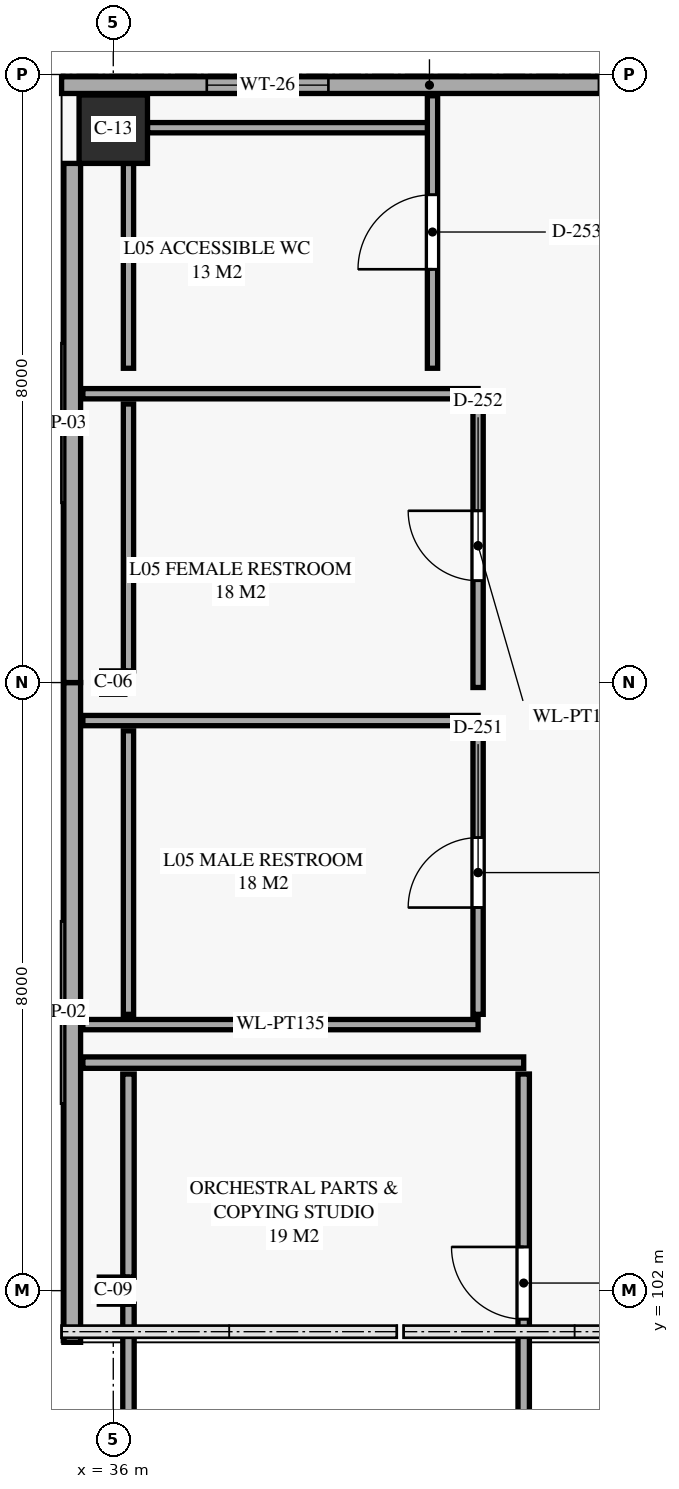
"""IFC4 building model, lengths in metres.
Left out: names, types, materials, properties, quantities, classifications, styles, units other than length and angle.
Written with IfcOpenShell. Run it as: python <this file> out.ifc"""

import sys

from ifc_helpers import new_model, si_unit, direction, frame, frame_2d, origin, origin_2d, place, context, subcontext, project, spatial, rectangle, i_section, extrude, element, fill, save


model = new_model("IFC4")
c1 = context("Model", 3, precision=1e-05, world=origin(), true_north=direction((0.0, 1.0)))
c2 = subcontext(c1, "Body", "Model", "MODEL_VIEW")
j1 = project(units=[si_unit("LENGTHUNIT", "METRE"), si_unit("PLANEANGLEUNIT", "RADIAN")], contexts=[c1])
p1 = place(None, origin())
s1 = spatial("IfcSite", under=j1, at=p1, CompositionType="ELEMENT")
p2 = place(p1, origin())
s2 = spatial("IfcBuilding", under=s1, at=p2, CompositionType="ELEMENT")
p3 = place(p2, frame((0.0, 0.0, 24.8)))
s3 = spatial("IfcBuildingStorey", under=s2, at=p3, CompositionType="ELEMENT", Elevation=24.8)
p4 = place(p3, frame((36.0, 102.0, 0.0), z_axis=(0.0, 0.0, 1.0), x_axis=(1.0, 0.0, 0.0)))
e1 = element("IfcColumn", 1, at=p4, inside=s3, PredefinedType="COLUMN", context=c2, shape_type="SweptSolid", body=[
    extrude(i_section(OverallWidth=0.368, OverallDepth=0.356, WebThickness=0.011, FlangeThickness=0.018, FilletRadius=0.015, at=origin_2d()), origin(), (0.0, 0.0, 1.0), 4.53),
])
p5 = place(p3, frame((36.0, 110.0, 0.0), z_axis=(0.0, 0.0, 1.0), x_axis=(1.0, 0.0, 0.0)))
e2 = element("IfcColumn", 2, at=p5, inside=s3, PredefinedType="COLUMN", context=c2, shape_type="SweptSolid", body=[
    extrude(i_section(OverallWidth=0.305, OverallDepth=0.307, WebThickness=0.01, FlangeThickness=0.015, FilletRadius=0.013, at=origin_2d()), origin(), (0.0, 0.0, 1.0), 4.53),
])
p6 = place(p3, frame((36.0, 117.28, 0.0), z_axis=(0.0, 0.0, 1.0), x_axis=(1.0, 0.0, 0.0)))
e3 = element("IfcColumn", 3, at=p6, inside=s3, PredefinedType="COLUMN", context=c2, shape_type="SweptSolid", body=[
    extrude(rectangle(XDim=0.9, YDim=0.9, at=origin_2d()), origin(), (0.0, 0.0, 1.0), 4.53),
])
p7 = place(p3, frame((35.46, 101.32, 0.0), z_axis=(0.0, 0.0, 1.0), x_axis=(0.0, 1.0, 0.0)))
e4 = element("IfcWall", 4, at=p7, inside=s3, PredefinedType="SOLIDWALL", context=c2, shape_type="SweptSolid", body=[
    extrude(rectangle(XDim=8.68, YDim=0.22, at=frame_2d((4.34, 0.0))), origin(), (0.0, 0.0, 1.0), 4.53),
])
p8 = place(p3, frame((35.46, 110.0, 0.0), z_axis=(0.0, 0.0, 1.0), x_axis=(0.0, 1.0, 0.0)))
e5 = element("IfcWall", 5, at=p8, inside=s3, PredefinedType="SOLIDWALL", context=c2, shape_type="SweptSolid", body=[
    extrude(rectangle(XDim=6.83, YDim=0.22, at=frame_2d((3.415, 0.0))), origin(), (0.0, 0.0, 1.0), 4.53),
])
p9 = place(p3, frame((35.32, 117.86, 0.0), z_axis=(0.0, 0.0, 1.0), x_axis=(1.0, 0.0, 0.0)))
e6 = element("IfcWall", 6, at=p9, inside=s3, PredefinedType="SOLIDWALL", context=c2, shape_type="SweptSolid", body=[
    extrude(rectangle(XDim=9.68, YDim=0.22, at=frame_2d((4.84, 0.0))), origin(), (0.0, 0.0, 1.0), 4.53),
])
p10 = place(p9, frame((1.91, 0.0, 0.8)))
e7 = element("IfcOpeningElement", 7, at=p10, cuts=e6, PredefinedType="OPENING", context=c2, shape_type="SweptSolid", body=[
    extrude(rectangle(XDim=1.6, YDim=1.5, at=frame_2d((0.8, 0.75))), frame((0.0, 0.12, 0.0), z_axis=(0.0, -1.0, 0.0), x_axis=(1.0, 0.0, 0.0)), (0.0, 0.0, 1.0), 0.24),
])
p11 = place(p9, frame((7.07, 0.0, 0.65)))
e8 = element("IfcOpeningElement", 8, at=p11, cuts=e6, PredefinedType="OPENING", context=c2, shape_type="SweptSolid", body=[
    extrude(rectangle(XDim=1.8, YDim=2.3, at=frame_2d((0.9, 1.15))), frame((0.0, 0.12, 0.0), z_axis=(0.0, -1.0, 0.0), x_axis=(1.0, 0.0, 0.0)), (0.0, 0.0, 1.0), 0.24),
])
p12 = place(p3, frame((41.4, 105.0, 0.0), z_axis=(0.0, 0.0, 1.0), x_axis=(-1.0, 0.0, 0.0)))
e9 = element("IfcWall", 9, at=p12, inside=s3, PredefinedType="PARTITIONING", context=c2, shape_type="SweptSolid", body=[
    extrude(rectangle(XDim=5.8, YDim=0.15, at=frame_2d((2.9, 0.0))), origin(), (0.0, 0.0, 1.0), 4.53),
])
p13 = place(p3, frame((36.2, 104.85, 0.0), z_axis=(0.0, 0.0, 1.0), x_axis=(0.0, -1.0, 0.0)))
e10 = element("IfcWall", 10, at=p13, inside=s3, PredefinedType="PARTITIONING", context=c2, shape_type="SweptSolid", body=[
    extrude(rectangle(XDim=2.672, YDim=0.15, at=frame_2d((1.336, 0.0))), origin(), (0.0, 0.0, 1.0), 4.053),
])
p14 = place(p3, frame((36.2, 101.822, 0.0), z_axis=(0.0, 0.0, 1.0), x_axis=(0.0, -1.0, 0.0)))
e11 = element("IfcWall", 11, at=p14, inside=s3, PredefinedType="PARTITIONING", context=c2, shape_type="SweptSolid", body=[
    extrude(rectangle(XDim=5.672, YDim=0.15, at=frame_2d((2.836, 0.0))), origin(), (0.0, 0.0, 1.0), 4.53),
])
p15 = place(p3, frame((41.4, 96.15, 0.0), z_axis=(0.0, 0.0, 1.0), x_axis=(0.0, 1.0, 0.0)))
e12 = element("IfcWall", 12, at=p15, inside=s3, PredefinedType="PARTITIONING", context=c2, shape_type="SweptSolid", body=[
    extrude(rectangle(XDim=8.7, YDim=0.15, at=frame_2d((4.35, 0.0))), origin(), (0.0, 0.0, 1.0), 4.53),
])
p16 = place(p15, frame((5.475, 0.0, 0.0)))
e13 = element("IfcOpeningElement", 13, at=p16, cuts=e12, PredefinedType="OPENING", context=c2, shape_type="SweptSolid", body=[
    extrude(rectangle(XDim=0.95, YDim=2.15, at=frame_2d((0.475, 1.075))), frame((0.0, 0.085, 0.0), z_axis=(0.0, -1.0, 0.0), x_axis=(1.0, 0.0, 0.0)), (0.0, 0.0, 1.0), 0.17),
])
for number, where, z_axis, x_axis in (
    (14, (35.6, 105.5, 0.0), (0.0, 0.0, 1.0), (1.0, 0.0, 0.0)),
    (15, (40.8, 109.5, 0.0), (0.0, 0.0, 1.0), (-1.0, 0.0, 0.0)),
):
    element("IfcWall", number, at=place(p3, frame(where, z_axis=z_axis, x_axis=x_axis)), inside=s3, PredefinedType="PARTITIONING", context=c2, shape_type="SweptSolid", body=[
        extrude(rectangle(XDim=5.2, YDim=0.135, at=frame_2d((2.6, 0.0))), origin(), (0.0, 0.0, 1.0), 4.53),
    ])
p17 = place(p3, frame((36.2, 109.365, 0.0), z_axis=(0.0, 0.0, 1.0), x_axis=(0.0, -1.0, 0.0)))
e16 = element("IfcWall", 16, at=p17, inside=s3, PredefinedType="PARTITIONING", context=c2, shape_type="SweptSolid", body=[
    extrude(rectangle(XDim=3.73, YDim=0.135, at=frame_2d((1.865, 0.0))), origin(), (0.0, 0.0, 1.0), 4.053),
])
p18 = place(p3, frame((40.8, 105.635, 0.0), z_axis=(0.0, 0.0, 1.0), x_axis=(0.0, 1.0, 0.0)))
e17 = element("IfcWall", 17, at=p18, inside=s3, PredefinedType="PARTITIONING", context=c2, shape_type="SweptSolid", body=[
    extrude(rectangle(XDim=3.73, YDim=0.135, at=frame_2d((1.865, 0.0))), origin(), (0.0, 0.0, 1.0), 4.53),
])
p19 = place(p18, frame((1.405, 0.0, 0.0)))
e18 = element("IfcOpeningElement", 18, at=p19, cuts=e17, PredefinedType="OPENING", context=c2, shape_type="SweptSolid", body=[
    extrude(rectangle(XDim=0.92, YDim=2.1, at=frame_2d((0.46, 1.05))), frame((0.0, 0.078, 0.0), z_axis=(0.0, -1.0, 0.0), x_axis=(1.0, 0.0, 0.0)), (0.0, 0.0, 1.0), 0.155),
])
p20 = place(p3, frame((40.8, 113.8, 0.0), z_axis=(0.0, 0.0, 1.0), x_axis=(-1.0, 0.0, 0.0)))
e19 = element("IfcWall", 19, at=p20, inside=s3, PredefinedType="PARTITIONING", context=c2, shape_type="SweptSolid", body=[
    extrude(rectangle(XDim=5.2, YDim=0.135, at=frame_2d((2.6, 0.0))), origin(), (0.0, 0.0, 1.0), 4.53),
])
p21 = place(p3, frame((36.2, 113.665, 0.0), z_axis=(0.0, 0.0, 1.0), x_axis=(0.0, -1.0, 0.0)))
e20 = element("IfcWall", 20, at=p21, inside=s3, PredefinedType="PARTITIONING", context=c2, shape_type="SweptSolid", body=[
    extrude(rectangle(XDim=3.511, YDim=0.135, at=frame_2d((1.756, 0.0))), origin(), (0.0, 0.0, 1.0), 3.82),
])
p22 = place(p3, frame((40.8, 109.935, 0.0), z_axis=(0.0, 0.0, 1.0), x_axis=(0.0, 1.0, 0.0)))
e21 = element("IfcWall", 21, at=p22, inside=s3, PredefinedType="PARTITIONING", context=c2, shape_type="SweptSolid", body=[
    extrude(rectangle(XDim=3.73, YDim=0.135, at=frame_2d((1.865, 0.0))), origin(), (0.0, 0.0, 1.0), 4.53),
])
p23 = place(p22, frame((1.405, 0.0, 0.0)))
e22 = element("IfcOpeningElement", 22, at=p23, cuts=e21, PredefinedType="OPENING", context=c2, shape_type="SweptSolid", body=[
    extrude(rectangle(XDim=0.92, YDim=2.1, at=frame_2d((0.46, 1.05))), frame((0.0, 0.078, 0.0), z_axis=(0.0, -1.0, 0.0), x_axis=(1.0, 0.0, 0.0)), (0.0, 0.0, 1.0), 0.155),
])
p24 = place(p3, frame((40.2, 117.3, 0.0), z_axis=(0.0, 0.0, 1.0), x_axis=(-1.0, 0.0, 0.0)))
e23 = element("IfcWall", 23, at=p24, inside=s3, PredefinedType="PARTITIONING", context=c2, shape_type="SweptSolid", body=[
    extrude(rectangle(XDim=3.75, YDim=0.135, at=frame_2d((1.875, 0.0))), origin(), (0.0, 0.0, 1.0), 3.82),
])
p25 = place(p3, frame((36.2, 116.83, 0.0), z_axis=(0.0, 0.0, 1.0), x_axis=(0.0, -1.0, 0.0)))
e24 = element("IfcWall", 24, at=p25, inside=s3, PredefinedType="PARTITIONING", context=c2, shape_type="SweptSolid", body=[
    extrude(rectangle(XDim=2.695, YDim=0.135, at=frame_2d((1.348, 0.0))), origin(), (0.0, 0.0, 1.0), 3.82),
])
p26 = place(p3, frame((40.2, 114.135, 0.0), z_axis=(0.0, 0.0, 1.0), x_axis=(0.0, 1.0, 0.0)))
e25 = element("IfcWall", 25, at=p26, inside=s3, PredefinedType="PARTITIONING", context=c2, shape_type="SweptSolid", body=[
    extrude(rectangle(XDim=3.585, YDim=0.135, at=frame_2d((1.792, 0.0))), origin(), (0.0, 0.0, 1.0), 4.53),
])
p27 = place(p26, frame((1.302, 0.0, 0.0)))
e26 = element("IfcOpeningElement", 26, at=p27, cuts=e25, PredefinedType="OPENING", context=c2, shape_type="SweptSolid", body=[
    extrude(rectangle(XDim=0.98, YDim=2.1, at=frame_2d((0.49, 1.05))), frame((0.0, 0.078, 0.0), z_axis=(0.0, -1.0, 0.0), x_axis=(1.0, 0.0, 0.0)), (0.0, 0.0, 1.0), 0.155),
])
p28 = place(p10, origin())
e27 = element("IfcWindow", 27, at=p28, inside=s3, PartitioningType="SINGLE_PANEL", PredefinedType="WINDOW", context=c2, shape_type="SweptSolid", body=[
    extrude(rectangle(XDim=1.6, YDim=1.5, at=frame_2d((0.8, 0.75))), frame((0.0, 0.03, 0.0), z_axis=(0.0, -1.0, 0.0), x_axis=(1.0, 0.0, 0.0)), (0.0, 0.0, 1.0), 0.06),
])
fill(e7, e27)
p29 = place(p11, origin())
e28 = element("IfcWindow", 28, at=p29, inside=s3, PartitioningType="SINGLE_PANEL", PredefinedType="WINDOW", context=c2, shape_type="SweptSolid", body=[
    extrude(rectangle(XDim=1.8, YDim=2.3, at=frame_2d((0.9, 1.15))), frame((0.0, 0.03, 0.0), z_axis=(0.0, -1.0, 0.0), x_axis=(1.0, 0.0, 0.0)), (0.0, 0.0, 1.0), 0.06),
])
fill(e8, e28)
p30 = place(p16, origin())
e29 = element("IfcDoor", 29, at=p30, inside=s3, OperationType="SINGLE_SWING_RIGHT", PredefinedType="DOOR", context=c2, shape_type="SweptSolid", body=[
    extrude(rectangle(XDim=0.95, YDim=2.15, at=frame_2d((0.475, 1.075))), frame((0.0, 0.025, 0.0), z_axis=(0.0, -1.0, 0.0), x_axis=(1.0, 0.0, 0.0)), (0.0, 0.0, 1.0), 0.05),
])
fill(e13, e29)
p31 = place(p19, origin())
e30 = element("IfcDoor", 30, at=p31, inside=s3, OperationType="SINGLE_SWING_LEFT", PredefinedType="DOOR", context=c2, shape_type="SweptSolid", body=[
    extrude(rectangle(XDim=0.92, YDim=2.1, at=frame_2d((0.46, 1.05))), frame((0.0, 0.025, 0.0), z_axis=(0.0, -1.0, 0.0), x_axis=(1.0, 0.0, 0.0)), (0.0, 0.0, 1.0), 0.05),
])
fill(e18, e30)
p32 = place(p23, origin())
e31 = element("IfcDoor", 31, at=p32, inside=s3, OperationType="SINGLE_SWING_RIGHT", PredefinedType="DOOR", context=c2, shape_type="SweptSolid", body=[
    extrude(rectangle(XDim=0.92, YDim=2.1, at=frame_2d((0.46, 1.05))), frame((0.0, 0.025, 0.0), z_axis=(0.0, -1.0, 0.0), x_axis=(1.0, 0.0, 0.0)), (0.0, 0.0, 1.0), 0.05),
])
fill(e22, e31)
p33 = place(p27, origin())
e32 = element("IfcDoor", 32, at=p33, inside=s3, OperationType="SINGLE_SWING_LEFT", PredefinedType="DOOR", context=c2, shape_type="SweptSolid", body=[
    extrude(rectangle(XDim=0.98, YDim=2.1, at=frame_2d((0.49, 1.05))), frame((0.0, 0.025, 0.0), z_axis=(0.0, -1.0, 0.0), x_axis=(1.0, 0.0, 0.0)), (0.0, 0.0, 1.0), 0.05),
])
fill(e26, e32)
save(model, sys.argv[1])
